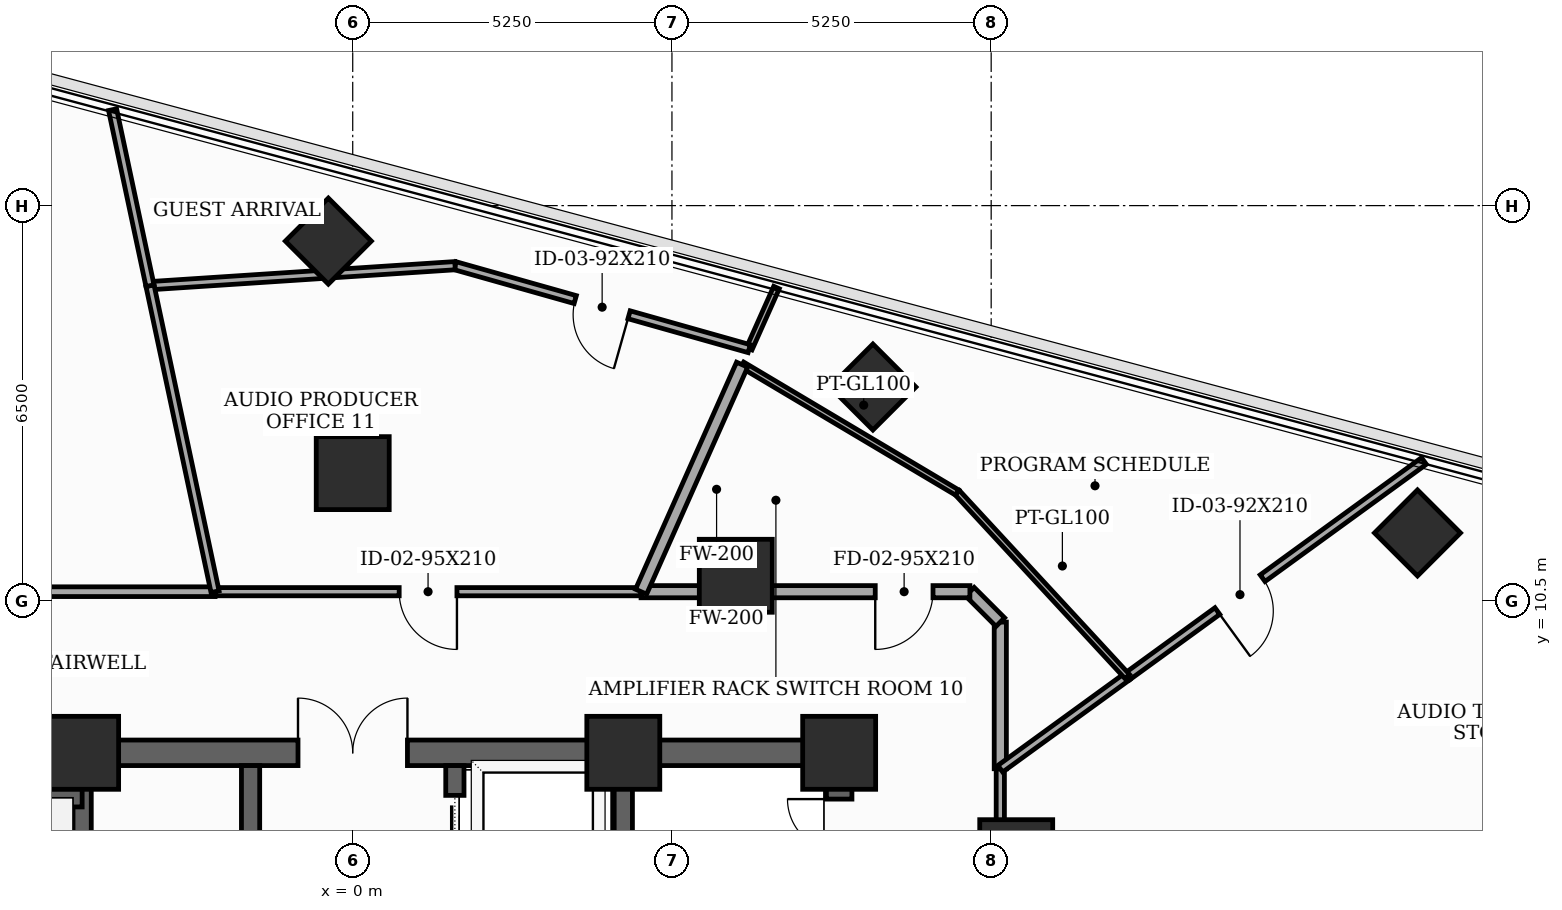
"""IFC4 building model, lengths in metres.
Left out: names, types, materials, properties, quantities, classifications, styles, units other than length and angle.
Written with IfcOpenShell. Run it as: python <this file> out.ifc"""

import sys

from ifc_helpers import new_model, si_unit, direction, frame, frame_2d, origin, origin_2d, place, context, subcontext, project, spatial, rectangle, extrude, element, fill, save


model = new_model("IFC4")
c1 = context("Model", 3, precision=1e-05, world=origin(), true_north=direction((0.0, 1.0)))
c2 = subcontext(c1, "Body", "Model", "MODEL_VIEW")
j1 = project(units=[si_unit("LENGTHUNIT", "METRE"), si_unit("PLANEANGLEUNIT", "RADIAN")], contexts=[c1])
p1 = place(None, origin())
s1 = spatial("IfcSite", under=j1, at=p1, CompositionType="ELEMENT")
p2 = place(p1, origin())
s2 = spatial("IfcBuilding", under=s1, at=p2, CompositionType="ELEMENT")
p3 = place(p2, frame((0.0, 0.0, 184.2)))
s3 = spatial("IfcBuildingStorey", under=s2, at=p3, CompositionType="ELEMENT", Elevation=184.2)
for number, where, z_axis, x_axis in (
    (1, (8.0, 8.0, 0.0), (0.0, 0.0, 1.0), (1.0, 0.0, 0.0)),
    (2, (4.45, 8.0, 0.0), (0.0, 0.0, 1.0), (1.0, 0.0, 0.0)),
    (3, (-4.45, 8.0, 0.0), (0.0, 0.0, 1.0), (1.0, 0.0, 0.0)),
    (4, (10.912, 6.3, 0.0), (0.0, 0.0, 1.0), (1.0, 0.0, 0.0)),
    (5, (6.3, 10.912, 0.0), (0.0, 0.0, 1.0), (1.0, 0.0, 0.0)),
    (6, (0.0, 12.6, 0.0), (0.0, 0.0, 1.0), (1.0, 0.0, 0.0)),
):
    element("IfcColumn", number, at=place(p3, frame(where, z_axis=z_axis, x_axis=x_axis)), inside=s3, PredefinedType="COLUMN", context=c2, shape_type="SweptSolid", body=[
        extrude(rectangle(XDim=1.2, YDim=1.2, at=origin_2d()), origin(), (0.0, 0.0, 1.0), 3.7),
    ])
for number, where, z_axis, x_axis in (
    (7, (17.511, 11.616, 0.0), (0.0, 0.0, 1.0), (0.707, 0.707, 0.0)),
    (8, (8.555, 14.016, 0.0), (0.0, 0.0, 1.0), (0.707, 0.707, 0.0)),
    (9, (-0.401, 16.416, 0.0), (0.0, 0.0, 1.0), (0.707, 0.707, 0.0)),
):
    element("IfcColumn", number, at=place(p3, frame(where, z_axis=z_axis, x_axis=x_axis)), inside=s3, PredefinedType="COLUMN", context=c2, shape_type="SweptSolid", body=[
        extrude(rectangle(XDim=1.0, YDim=1.0, at=origin_2d()), origin(), (0.0, 0.0, 1.0), 3.7),
    ])
p4 = place(p3, frame((8.0, -8.0, 0.0), z_axis=(0.0, 0.0, 1.0), x_axis=(0.0, 1.0, 0.0)))
e10 = element("IfcWall", 10, at=p4, inside=s3, PredefinedType="SHEAR", context=c2, shape_type="SweptSolid", body=[
    extrude(rectangle(XDim=16.0, YDim=0.42, at=frame_2d((8.0, 0.0))), origin(), (0.0, 0.0, 1.0), 3.5),
])
p5 = place(p4, frame((9.6, 0.0, 0.0)))
e11 = element("IfcOpeningElement", 11, at=p5, cuts=e10, PredefinedType="OPENING", context=c2, shape_type="SweptSolid", body=[
    extrude(rectangle(XDim=1.05, YDim=2.15, at=frame_2d((0.525, 1.075))), frame((0.0, 0.22, 0.0), z_axis=(0.0, -1.0, 0.0), x_axis=(1.0, 0.0, 0.0)), (0.0, 0.0, 1.0), 0.44),
])
p6 = place(p4, frame((14.389, 0.0, 0.0)))
e12 = element("IfcOpeningElement", 12, at=p6, cuts=e10, PredefinedType="OPENING", context=c2, shape_type="SweptSolid", body=[
    extrude(rectangle(XDim=0.85, YDim=2.02, at=frame_2d((0.425, 1.01))), frame((0.0, 0.22, 0.0), z_axis=(0.0, -1.0, 0.0), x_axis=(1.0, 0.0, 0.0)), (0.0, 0.0, 1.0), 0.44),
])
p7 = place(p3, frame((-8.0, 8.0, 0.0), z_axis=(0.0, 0.0, 1.0), x_axis=(1.0, 0.0, 0.0)))
e13 = element("IfcWall", 13, at=p7, inside=s3, PredefinedType="SHEAR", context=c2, shape_type="SweptSolid", body=[
    extrude(rectangle(XDim=16.0, YDim=0.42, at=frame_2d((8.0, 0.0))), origin(), (0.0, 0.0, 1.0), 3.5),
])
p8 = place(p7, frame((7.1, 0.0, 0.0)))
e14 = element("IfcOpeningElement", 14, at=p8, cuts=e13, PredefinedType="OPENING", context=c2, shape_type="SweptSolid", body=[
    extrude(rectangle(XDim=1.8, YDim=2.15, at=frame_2d((0.9, 1.075))), frame((0.0, 0.22, 0.0), z_axis=(0.0, -1.0, 0.0), x_axis=(1.0, 0.0, 0.0)), (0.0, 0.0, 1.0), 0.44),
])
for number, where, z_axis, x_axis in (
    (15, (-4.45, -7.79, 0.0), (0.0, 0.0, 1.0), (0.0, 1.0, 0.0)),
    (16, (4.45, -7.79, 0.0), (0.0, 0.0, 1.0), (0.0, 1.0, 0.0)),
):
    element("IfcWall", number, at=place(p3, frame(where, z_axis=z_axis, x_axis=x_axis)), inside=s3, PredefinedType="SHEAR", context=c2, shape_type="SweptSolid", body=[
        extrude(rectangle(XDim=15.58, YDim=0.3, at=frame_2d((7.79, 0.0))), origin(), (0.0, 0.0, 1.0), 3.5),
    ])
p9 = place(p3, frame((-7.79, 7.26, 0.0), z_axis=(0.0, 0.0, 1.0), x_axis=(1.0, 0.0, 0.0)))
e17 = element("IfcWall", 17, at=p9, inside=s3, PredefinedType="SHEAR", context=c2, shape_type="SweptSolid", body=[
    extrude(rectangle(XDim=3.34, YDim=0.3, at=frame_2d((1.67, 0.0))), origin(), (0.0, 0.0, 1.0), 3.5),
])
p10 = place(p3, frame((-1.68, -4.85, 0.0), z_axis=(0.0, 0.0, 1.0), x_axis=(0.0, 1.0, 0.0)))
e18 = element("IfcWall", 18, at=p10, inside=s3, PredefinedType="SHEAR", context=c2, shape_type="SweptSolid", body=[
    extrude(rectangle(XDim=12.64, YDim=0.3, at=frame_2d((6.32, 0.0))), origin(), (0.0, 0.0, 1.0), 3.5),
])
p11 = place(p10, frame((2.6, 0.0, 0.0)))
e19 = element("IfcOpeningElement", 19, at=p11, cuts=e18, PredefinedType="OPENING", context=c2, shape_type="SweptSolid", body=[
    extrude(rectangle(XDim=0.95, YDim=2.1, at=frame_2d((0.475, 1.05))), frame((0.0, 0.16, 0.0), z_axis=(0.0, -1.0, 0.0), x_axis=(1.0, 0.0, 0.0)), (0.0, 0.0, 1.0), 0.32),
])
p12 = place(p10, frame((8.8, 0.0, 0.0)))
e20 = element("IfcOpeningElement", 20, at=p12, cuts=e18, PredefinedType="OPENING", context=c2, shape_type="SweptSolid", body=[
    extrude(rectangle(XDim=0.95, YDim=2.1, at=frame_2d((0.475, 1.05))), frame((0.0, 0.16, 0.0), z_axis=(0.0, -1.0, 0.0), x_axis=(1.0, 0.0, 0.0)), (0.0, 0.0, 1.0), 0.32),
])
p13 = place(p3, frame((1.68, -4.85, 0.0), z_axis=(0.0, 0.0, 1.0), x_axis=(0.0, 1.0, 0.0)))
e21 = element("IfcWall", 21, at=p13, inside=s3, PredefinedType="SHEAR", context=c2, shape_type="SweptSolid", body=[
    extrude(rectangle(XDim=12.64, YDim=0.3, at=frame_2d((6.32, 0.0))), origin(), (0.0, 0.0, 1.0), 3.5),
])
p14 = place(p13, frame((0.55, 0.0, 0.0)))
e22 = element("IfcOpeningElement", 22, at=p14, cuts=e21, PredefinedType="OPENING", context=c2, shape_type="SweptSolid", body=[
    extrude(rectangle(XDim=1.1, YDim=2.1, at=frame_2d((0.55, 1.05))), frame((0.0, 0.16, 0.0), z_axis=(0.0, -1.0, 0.0), x_axis=(1.0, 0.0, 0.0)), (0.0, 0.0, 1.0), 0.32),
])
p15 = place(p13, frame((2.65, 0.0, 0.0)))
e23 = element("IfcOpeningElement", 23, at=p15, cuts=e21, PredefinedType="OPENING", context=c2, shape_type="SweptSolid", body=[
    extrude(rectangle(XDim=1.1, YDim=2.1, at=frame_2d((0.55, 1.05))), frame((0.0, 0.16, 0.0), z_axis=(0.0, -1.0, 0.0), x_axis=(1.0, 0.0, 0.0)), (0.0, 0.0, 1.0), 0.32),
])
p16 = place(p13, frame((4.75, 0.0, 0.0)))
e24 = element("IfcOpeningElement", 24, at=p16, cuts=e21, PredefinedType="OPENING", context=c2, shape_type="SweptSolid", body=[
    extrude(rectangle(XDim=1.1, YDim=2.1, at=frame_2d((0.55, 1.05))), frame((0.0, 0.16, 0.0), z_axis=(0.0, -1.0, 0.0), x_axis=(1.0, 0.0, 0.0)), (0.0, 0.0, 1.0), 0.32),
])
p17 = place(p13, frame((6.85, 0.0, 0.0)))
e25 = element("IfcOpeningElement", 25, at=p17, cuts=e21, PredefinedType="OPENING", context=c2, shape_type="SweptSolid", body=[
    extrude(rectangle(XDim=1.1, YDim=2.1, at=frame_2d((0.55, 1.05))), frame((0.0, 0.16, 0.0), z_axis=(0.0, -1.0, 0.0), x_axis=(1.0, 0.0, 0.0)), (0.0, 0.0, 1.0), 0.32),
])
p18 = place(p13, frame((8.95, 0.0, 0.0)))
e26 = element("IfcOpeningElement", 26, at=p18, cuts=e21, PredefinedType="OPENING", context=c2, shape_type="SweptSolid", body=[
    extrude(rectangle(XDim=1.1, YDim=2.1, at=frame_2d((0.55, 1.05))), frame((0.0, 0.16, 0.0), z_axis=(0.0, -1.0, 0.0), x_axis=(1.0, 0.0, 0.0)), (0.0, 0.0, 1.0), 0.32),
])
p19 = place(p13, frame((11.05, 0.0, 0.0)))
e27 = element("IfcOpeningElement", 27, at=p19, cuts=e21, PredefinedType="OPENING", context=c2, shape_type="SweptSolid", body=[
    extrude(rectangle(XDim=1.1, YDim=2.1, at=frame_2d((0.55, 1.05))), frame((0.0, 0.16, 0.0), z_axis=(0.0, -1.0, 0.0), x_axis=(1.0, 0.0, 0.0)), (0.0, 0.0, 1.0), 0.32),
])
p20 = place(p3, frame((10.65, 2.45, 0.0), z_axis=(0.0, 0.0, 1.0), x_axis=(0.0, 1.0, 0.0)))
e28 = element("IfcWall", 28, at=p20, inside=s3, PredefinedType="PARTITIONING", context=c2, shape_type="SweptSolid", body=[
    extrude(rectangle(XDim=5.288, YDim=0.135, at=frame_2d((2.644, 0.0))), origin(), (0.0, 0.0, 1.0), 2.885),
])
p21 = place(p20, frame((0.583, 0.0, 0.0)))
e29 = element("IfcOpeningElement", 29, at=p21, cuts=e28, PredefinedType="OPENING", context=c2, shape_type="SweptSolid", body=[
    extrude(rectangle(XDim=0.95, YDim=2.1, at=frame_2d((0.475, 1.05))), frame((0.0, 0.077, 0.0), z_axis=(0.0, -1.0, 0.0), x_axis=(1.0, 0.0, 0.0)), (0.0, 0.0, 1.0), 0.155),
])
p22 = place(p3, frame((10.65, 7.738, 0.0), z_axis=(0.0, 0.0, 1.0), x_axis=(0.0, 1.0, 0.0)))
e30 = element("IfcWall", 30, at=p22, inside=s3, PredefinedType="SOLIDWALL", context=c2, shape_type="SweptSolid", body=[
    extrude(rectangle(XDim=2.412, YDim=0.2, at=frame_2d((1.206, 0.0))), origin(), (0.0, 0.0, 1.0), 3.5),
])
p23 = place(p3, frame((10.65, 10.15, 0.0), z_axis=(0.0, 0.0, 1.0), x_axis=(-0.707106781187, 0.707106781187, 0.0)))
e31 = element("IfcWall", 31, at=p23, inside=s3, PredefinedType="SOLIDWALL", context=c2, shape_type="SweptSolid", body=[
    extrude(rectangle(XDim=0.707, YDim=0.2, at=frame_2d((0.354, 0.0))), origin(), (0.0, 0.0, 1.0), 3.5),
])
p24 = place(p3, frame((10.15, 10.65, 0.0), z_axis=(0.0, 0.0, 1.0), x_axis=(-1.0, 0.0, 0.0)))
e32 = element("IfcWall", 32, at=p24, inside=s3, PredefinedType="SOLIDWALL", context=c2, shape_type="SweptSolid", body=[
    extrude(rectangle(XDim=5.408, YDim=0.2, at=frame_2d((2.704, 0.0))), origin(), (0.0, 0.0, 1.0), 2.885),
])
p25 = place(p24, frame((0.607, 0.0, 0.0)))
e33 = element("IfcOpeningElement", 33, at=p25, cuts=e32, PredefinedType="OPENING", context=c2, shape_type="SweptSolid", body=[
    extrude(rectangle(XDim=0.95, YDim=2.1, at=frame_2d((0.475, 1.05))), frame((0.0, 0.11, 0.0), z_axis=(0.0, -1.0, 0.0), x_axis=(1.0, 0.0, 0.0)), (0.0, 0.0, 1.0), 0.22),
])
p26 = place(p3, frame((4.742, 10.65, 0.0), z_axis=(0.0, 0.0, 1.0), x_axis=(-1.0, 0.0, 0.0)))
e34 = element("IfcWall", 34, at=p26, inside=s3, PredefinedType="PARTITIONING", context=c2, shape_type="SweptSolid", body=[
    extrude(rectangle(XDim=7.006, YDim=0.135, at=frame_2d((3.503, 0.0))), origin(), (0.0, 0.0, 1.0), 2.885),
])
p27 = place(p26, frame((3.028, 0.0, 0.0)))
e35 = element("IfcOpeningElement", 35, at=p27, cuts=e34, PredefinedType="OPENING", context=c2, shape_type="SweptSolid", body=[
    extrude(rectangle(XDim=0.95, YDim=2.1, at=frame_2d((0.475, 1.05))), frame((0.0, 0.077, 0.0), z_axis=(0.0, -1.0, 0.0), x_axis=(1.0, 0.0, 0.0)), (0.0, 0.0, 1.0), 0.155),
])
p28 = place(p3, frame((-2.264, 10.65, 0.0), z_axis=(0.0, 0.0, 1.0), x_axis=(-1.0, 0.0, 0.0)))
e36 = element("IfcWall", 36, at=p28, inside=s3, PredefinedType="PARTITIONING", context=c2, shape_type="SweptSolid", body=[
    extrude(rectangle(XDim=7.886, YDim=0.16, at=frame_2d((3.943, 0.0))), origin(), (0.0, 0.0, 1.0), 2.885),
])
p29 = place(p3, frame((17.617, 12.8, 0.0), z_axis=(0.0, 0.0, 1.0), x_axis=(-0.809021342768, -0.587779267196, 0.0)))
e37 = element("IfcWall", 37, at=p29, inside=s3, PredefinedType="PARTITIONING", context=c2, shape_type="SweptSolid", body=[
    extrude(rectangle(XDim=6.031, YDim=0.135, at=frame_2d((3.015, 0.0))), origin(), (0.0, 0.0, 1.0), 2.985),
])
p30 = place(p29, frame((3.279, 0.0, 0.0)))
e38 = element("IfcOpeningElement", 38, at=p30, cuts=e37, PredefinedType="OPENING", context=c2, shape_type="SweptSolid", body=[
    extrude(rectangle(XDim=0.92, YDim=2.1, at=frame_2d((0.46, 1.05))), frame((0.0, 0.077, 0.0), z_axis=(0.0, -1.0, 0.0), x_axis=(1.0, 0.0, 0.0)), (0.0, 0.0, 1.0), 0.155),
])
p31 = place(p3, frame((12.738, 9.255, 0.0), z_axis=(0.0, 0.0, 1.0), x_axis=(-0.809067292609, -0.587716016483, 0.0)))
e39 = element("IfcWall", 39, at=p31, inside=s3, PredefinedType="PARTITIONING", context=c2, shape_type="SweptSolid", body=[
    extrude(rectangle(XDim=2.581, YDim=0.135, at=frame_2d((1.291, 0.0))), origin(), (0.0, 0.0, 1.0), 3.5),
])
p32 = place(p3, frame((6.404, 14.384, 0.0), z_axis=(0.0, 0.0, 1.0), x_axis=(0.859464079119, -0.511196143085, 0.0)))
e40 = element("IfcWall", 40, at=p32, inside=s3, PredefinedType="MOVABLE", context=c2, shape_type="SweptSolid", body=[
    extrude(rectangle(XDim=4.118, YDim=0.1, at=frame_2d((2.059, 0.0))), origin(), (0.0, 0.0, 1.0), 2.985),
])
p33 = place(p3, frame((9.943, 12.279, 0.0), z_axis=(0.0, 0.0, 1.0), x_axis=(0.678723214903, -0.734394170423, 0.0)))
e41 = element("IfcWall", 41, at=p33, inside=s3, PredefinedType="MOVABLE", context=c2, shape_type="SweptSolid", body=[
    extrude(rectangle(XDim=4.118, YDim=0.1, at=frame_2d((2.059, 0.0))), origin(), (0.0, 0.0, 1.0), 3.5),
])
p34 = place(p3, frame((6.969, 15.653, 0.0), z_axis=(0.0, 0.0, 1.0), x_axis=(-0.407125799041, -0.913372094907, 0.0)))
e42 = element("IfcWall", 42, at=p34, inside=s3, PredefinedType="MOVABLE", context=c2, shape_type="SweptSolid", body=[
    extrude(rectangle(XDim=1.101, YDim=0.1, at=frame_2d((0.551, 0.0))), origin(), (0.0, 0.0, 1.0), 2.985),
])
p35 = place(p3, frame((6.404, 14.384, 0.0), z_axis=(0.0, 0.0, 1.0), x_axis=(-0.406648271104, -0.913584798258, 0.0)))
e43 = element("IfcWall", 43, at=p35, inside=s3, PredefinedType="SOLIDWALL", context=c2, shape_type="SweptSolid", body=[
    extrude(rectangle(XDim=4.087, YDim=0.2, at=frame_2d((2.044, 0.0))), origin(), (0.0, 0.0, 1.0), 2.885),
])
p36 = place(p3, frame((6.521, 14.647, 0.0), z_axis=(0.0, 0.0, 1.0), x_axis=(-0.962425920656, 0.271544374364, 0.0)))
e44 = element("IfcWall", 44, at=p36, inside=s3, PredefinedType="PARTITIONING", context=c2, shape_type="SweptSolid", body=[
    extrude(rectangle(XDim=5.027, YDim=0.135, at=frame_2d((2.513, 0.0))), origin(), (0.0, 0.0, 1.0), 2.985),
])
p37 = place(p36, frame((2.053, 0.0, 0.0)))
e45 = element("IfcOpeningElement", 45, at=p37, cuts=e44, PredefinedType="OPENING", context=c2, shape_type="SweptSolid", body=[
    extrude(rectangle(XDim=0.92, YDim=2.1, at=frame_2d((0.46, 1.05))), frame((0.0, 0.077, 0.0), z_axis=(0.0, -1.0, 0.0), x_axis=(1.0, 0.0, 0.0)), (0.0, 0.0, 1.0), 0.155),
])
p38 = place(p3, frame((1.683, 16.012, 0.0), z_axis=(0.0, 0.0, 1.0), x_axis=(-0.997858663881, -0.065407086143, 0.0)))
e46 = element("IfcWall", 46, at=p38, inside=s3, PredefinedType="PARTITIONING", context=c2, shape_type="SweptSolid", body=[
    extrude(rectangle(XDim=5.028, YDim=0.135, at=frame_2d((2.514, 0.0))), origin(), (0.0, 0.0, 1.0), 2.985),
])
p39 = place(p3, frame((-3.334, 15.683, 0.0), z_axis=(0.0, 0.0, 1.0), x_axis=(0.207954085813, -0.978138588439, 0.0)))
e47 = element("IfcWall", 47, at=p39, inside=s3, PredefinedType="PARTITIONING", context=c2, shape_type="SweptSolid", body=[
    extrude(rectangle(XDim=5.146, YDim=0.135, at=frame_2d((2.573, 0.0))), origin(), (0.0, 0.0, 1.0), 2.885),
])
p40 = place(p3, frame((-3.949, 18.578, 0.0), z_axis=(0.0, 0.0, 1.0), x_axis=(0.207951490347, -0.978139140236, 0.0)))
e48 = element("IfcWall", 48, at=p40, inside=s3, PredefinedType="PARTITIONING", context=c2, shape_type="SweptSolid", body=[
    extrude(rectangle(XDim=2.96, YDim=0.135, at=frame_2d((1.48, 0.0))), origin(), (0.0, 0.0, 1.0), 2.985),
])
p41 = place(p6, origin())
e49 = element("IfcDoor", 49, at=p41, inside=s3, OperationType="SINGLE_SWING_RIGHT", PredefinedType="TRAPDOOR", context=c2, shape_type="SweptSolid", body=[
    extrude(rectangle(XDim=0.85, YDim=2.02, at=frame_2d((0.425, 1.01))), frame((0.0, 0.025, 0.0), z_axis=(0.0, -1.0, 0.0), x_axis=(1.0, 0.0, 0.0)), (0.0, 0.0, 1.0), 0.05),
])
fill(e12, e49)
p42 = place(p8, origin())
e50 = element("IfcDoor", 50, at=p42, inside=s3, OperationType="DOUBLE_DOOR_SINGLE_SWING", PredefinedType="DOOR", context=c2, shape_type="SweptSolid", body=[
    extrude(rectangle(XDim=1.8, YDim=2.15, at=frame_2d((0.9, 1.075))), frame((0.0, 0.025, 0.0), z_axis=(0.0, -1.0, 0.0), x_axis=(1.0, 0.0, 0.0)), (0.0, 0.0, 1.0), 0.05),
])
fill(e14, e50)
p43 = place(p19, origin())
e51 = element("IfcDoor", 51, at=p43, inside=s3, OperationType="SLIDING_TO_LEFT", PredefinedType="DOOR", context=c2, shape_type="SweptSolid", body=[
    extrude(rectangle(XDim=1.1, YDim=2.1, at=frame_2d((0.55, 1.05))), frame((0.0, 0.025, 0.0), z_axis=(0.0, -1.0, 0.0), x_axis=(1.0, 0.0, 0.0)), (0.0, 0.0, 1.0), 0.05),
])
fill(e27, e51)
p44 = place(p25, origin())
e52 = element("IfcDoor", 52, at=p44, inside=s3, OperationType="SINGLE_SWING_RIGHT", PredefinedType="DOOR", context=c2, shape_type="SweptSolid", body=[
    extrude(rectangle(XDim=0.95, YDim=2.1, at=frame_2d((0.475, 1.05))), frame((0.0, 0.025, 0.0), z_axis=(0.0, -1.0, 0.0), x_axis=(1.0, 0.0, 0.0)), (0.0, 0.0, 1.0), 0.05),
])
fill(e33, e52)
p45 = place(p27, origin())
e53 = element("IfcDoor", 53, at=p45, inside=s3, OperationType="SINGLE_SWING_LEFT", PredefinedType="DOOR", context=c2, shape_type="SweptSolid", body=[
    extrude(rectangle(XDim=0.95, YDim=2.1, at=frame_2d((0.475, 1.05))), frame((0.0, 0.025, 0.0), z_axis=(0.0, -1.0, 0.0), x_axis=(1.0, 0.0, 0.0)), (0.0, 0.0, 1.0), 0.05),
])
fill(e35, e53)
p46 = place(p30, origin())
e54 = element("IfcDoor", 54, at=p46, inside=s3, OperationType="SINGLE_SWING_RIGHT", PredefinedType="DOOR", context=c2, shape_type="SweptSolid", body=[
    extrude(rectangle(XDim=0.92, YDim=2.1, at=frame_2d((0.46, 1.05))), frame((0.0, 0.025, 0.0), z_axis=(0.0, -1.0, 0.0), x_axis=(1.0, 0.0, 0.0)), (0.0, 0.0, 1.0), 0.05),
])
fill(e38, e54)
p47 = place(p37, origin())
e55 = element("IfcDoor", 55, at=p47, inside=s3, OperationType="SINGLE_SWING_LEFT", PredefinedType="DOOR", context=c2, shape_type="SweptSolid", body=[
    extrude(rectangle(XDim=0.92, YDim=2.1, at=frame_2d((0.46, 1.05))), frame((0.0, 0.025, 0.0), z_axis=(0.0, -1.0, 0.0), x_axis=(1.0, 0.0, 0.0)), (0.0, 0.0, 1.0), 0.05),
])
fill(e45, e55)
save(model, sys.argv[1])
